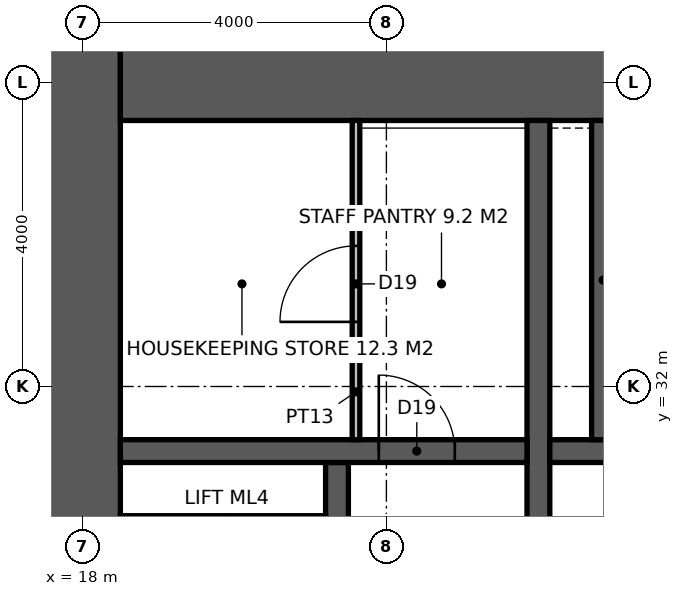
"""IFC4 building model, lengths in metres.
Left out: names, types, materials, properties, quantities, classifications, styles, units other than length and angle.
Written with IfcOpenShell. Run it as: python <this file> out.ifc"""

import sys

from ifc_helpers import new_model, si_unit, direction, frame, frame_2d, origin, place, context, subcontext, project, spatial, rectangle, extrude, element, fill, save


model = new_model("IFC4")
c1 = context("Model", 3, precision=1e-05, world=origin(), true_north=direction((0.0, 1.0)))
c2 = subcontext(c1, "Body", "Model", "MODEL_VIEW")
j1 = project(units=[si_unit("LENGTHUNIT", "METRE"), si_unit("PLANEANGLEUNIT", "RADIAN")], contexts=[c1])
p1 = place(None, origin())
s1 = spatial("IfcSite", under=j1, at=p1, CompositionType="ELEMENT")
p2 = place(p1, origin())
s2 = spatial("IfcBuilding", under=s1, at=p2, CompositionType="ELEMENT")
p3 = place(p2, frame((0.0, 0.0, 109.4)))
s3 = spatial("IfcBuildingStorey", under=s2, at=p3, CompositionType="ELEMENT", Elevation=109.4)
p4 = place(p3, frame((18.0, 17.5, -0.15), z_axis=(0.0, 0.0, 1.0), x_axis=(0.0, 1.0, 0.0)))
e1 = element("IfcWall", 1, at=p4, inside=s3, PredefinedType="SHEAR", context=c2, shape_type="SweptSolid", body=[
    extrude(rectangle(XDim=19.0, YDim=1.0, at=frame_2d((9.5, 0.0))), origin(), (0.0, 0.0, 1.0), 4.0),
])
p5 = place(p3, frame((18.5, 36.0, -0.15), z_axis=(0.0, 0.0, 1.0), x_axis=(1.0, 0.0, 0.0)))
e2 = element("IfcWall", 2, at=p5, inside=s3, PredefinedType="SHEAR", context=c2, shape_type="SweptSolid", body=[
    extrude(rectangle(XDim=17.6, YDim=1.0, at=frame_2d((8.8, 0.0))), origin(), (0.0, 0.0, 1.0), 4.0),
])
p6 = place(p3, frame((24.0, 18.5, -0.15), z_axis=(0.0, 0.0, 1.0), x_axis=(0.0, 1.0, 0.0)))
e3 = element("IfcWall", 3, at=p6, inside=s3, PredefinedType="SHEAR", context=c2, shape_type="SweptSolid", body=[
    extrude(rectangle(XDim=17.0, YDim=0.3, at=frame_2d((8.5, 0.0))), origin(), (0.0, 0.0, 1.0), 4.0),
])
p7 = place(p6, frame((9.6, 0.0, 0.15)))
e4 = element("IfcOpeningElement", 4, at=p7, cuts=e3, PredefinedType="OPENING", context=c2, shape_type="SweptSolid", body=[
    extrude(rectangle(XDim=1.5, YDim=2.4, at=frame_2d((0.75, 1.2))), frame((0.0, 0.16, 0.0), z_axis=(0.0, -1.0, 0.0), x_axis=(1.0, 0.0, 0.0)), (0.0, 0.0, 1.0), 0.32),
])
p8 = place(p3, frame((24.15, 31.15, -0.15), z_axis=(0.0, 0.0, 1.0), x_axis=(1.0, 0.0, 0.0)))
e5 = element("IfcWall", 5, at=p8, inside=s3, PredefinedType="SHEAR", context=c2, shape_type="SweptSolid", body=[
    extrude(rectangle(XDim=11.25, YDim=0.3, at=frame_2d((5.625, 0.0))), origin(), (0.0, 0.0, 1.0), 4.0),
])
p9 = place(p8, frame((7.25, 0.0, 0.15)))
e6 = element("IfcOpeningElement", 6, at=p9, cuts=e5, PredefinedType="OPENING", context=c2, shape_type="SweptSolid", body=[
    extrude(rectangle(XDim=1.4, YDim=2.4, at=frame_2d((0.7, 1.2))), frame((0.0, 0.16, 0.0), z_axis=(0.0, -1.0, 0.0), x_axis=(1.0, 0.0, 0.0)), (0.0, 0.0, 1.0), 0.32),
])
p10 = place(p3, frame((21.35, 18.5, -0.15), z_axis=(0.0, 0.0, 1.0), x_axis=(0.0, 1.0, 0.0)))
e7 = element("IfcWall", 7, at=p10, inside=s3, PredefinedType="SHEAR", context=c2, shape_type="SweptSolid", body=[
    extrude(rectangle(XDim=12.5, YDim=0.3, at=frame_2d((6.25, 0.0))), origin(), (0.0, 0.0, 1.0), 4.0),
])
p11 = place(p10, frame((0.875, 0.0, 0.15)))
e8 = element("IfcOpeningElement", 8, at=p11, cuts=e7, PredefinedType="OPENING", context=c2, shape_type="SweptSolid", body=[
    extrude(rectangle(XDim=1.1, YDim=2.2, at=frame_2d((0.55, 1.1))), frame((0.0, 0.16, 0.0), z_axis=(0.0, -1.0, 0.0), x_axis=(1.0, 0.0, 0.0)), (0.0, 0.0, 1.0), 0.32),
])
p12 = place(p10, frame((3.825, 0.0, 0.15)))
e9 = element("IfcOpeningElement", 9, at=p12, cuts=e7, PredefinedType="OPENING", context=c2, shape_type="SweptSolid", body=[
    extrude(rectangle(XDim=1.1, YDim=2.2, at=frame_2d((0.55, 1.1))), frame((0.0, 0.16, 0.0), z_axis=(0.0, -1.0, 0.0), x_axis=(1.0, 0.0, 0.0)), (0.0, 0.0, 1.0), 0.32),
])
p13 = place(p10, frame((6.675, 0.0, 0.15)))
e10 = element("IfcOpeningElement", 10, at=p13, cuts=e7, PredefinedType="OPENING", context=c2, shape_type="SweptSolid", body=[
    extrude(rectangle(XDim=1.1, YDim=2.2, at=frame_2d((0.55, 1.1))), frame((0.0, 0.16, 0.0), z_axis=(0.0, -1.0, 0.0), x_axis=(1.0, 0.0, 0.0)), (0.0, 0.0, 1.0), 0.32),
])
p14 = place(p10, frame((9.575, 0.0, 0.15)))
e11 = element("IfcOpeningElement", 11, at=p14, cuts=e7, PredefinedType="OPENING", context=c2, shape_type="SweptSolid", body=[
    extrude(rectangle(XDim=1.1, YDim=2.2, at=frame_2d((0.55, 1.1))), frame((0.0, 0.16, 0.0), z_axis=(0.0, -1.0, 0.0), x_axis=(1.0, 0.0, 0.0)), (0.0, 0.0, 1.0), 0.32),
])
p15 = place(p3, frame((18.5, 31.15, -0.15), z_axis=(0.0, 0.0, 1.0), x_axis=(1.0, 0.0, 0.0)))
e12 = element("IfcWall", 12, at=p15, inside=s3, PredefinedType="SHEAR", context=c2, shape_type="SweptSolid", body=[
    extrude(rectangle(XDim=5.35, YDim=0.3, at=frame_2d((2.675, 0.0))), origin(), (0.0, 0.0, 1.0), 4.0),
])
p16 = place(p15, frame((3.4, 0.0, 0.15)))
e13 = element("IfcOpeningElement", 13, at=p16, cuts=e12, PredefinedType="OPENING", context=c2, shape_type="SweptSolid", body=[
    extrude(rectangle(XDim=1.0, YDim=2.2, at=frame_2d((0.5, 1.1))), frame((0.0, 0.16, 0.0), z_axis=(0.0, -1.0, 0.0), x_axis=(1.0, 0.0, 0.0)), (0.0, 0.0, 1.0), 0.32),
])
p17 = place(p3, frame((24.85, 31.3, -0.15), z_axis=(0.0, 0.0, 1.0), x_axis=(0.0, 1.0, 0.0)))
e14 = element("IfcWall", 14, at=p17, inside=s3, PredefinedType="SHEAR", context=c2, shape_type="SweptSolid", body=[
    extrude(rectangle(XDim=4.2, YDim=0.3, at=frame_2d((2.1, 0.0))), origin(), (0.0, 0.0, 1.0), 4.0),
])
p18 = place(p3, frame((21.6, 31.3, 0.0), z_axis=(0.0, 0.0, 1.0), x_axis=(0.0, 1.0, 0.0)))
e15 = element("IfcWall", 15, at=p18, inside=s3, PredefinedType="PARTITIONING", context=c2, shape_type="SweptSolid", body=[
    extrude(rectangle(XDim=4.2, YDim=0.1, at=frame_2d((2.1, 0.0))), origin(), (0.0, 0.0, 1.0), 3.85),
])
p19 = place(p18, frame((1.55, 0.0, 0.0)))
e16 = element("IfcOpeningElement", 16, at=p19, cuts=e15, PredefinedType="OPENING", context=c2, shape_type="SweptSolid", body=[
    extrude(rectangle(XDim=1.0, YDim=2.2, at=frame_2d((0.5, 1.1))), frame((0.0, 0.06, 0.0), z_axis=(0.0, -1.0, 0.0), x_axis=(1.0, 0.0, 0.0)), (0.0, 0.0, 1.0), 0.12),
])
p20 = place(p16, origin())
e17 = element("IfcDoor", 17, at=p20, inside=s3, OperationType="SINGLE_SWING_LEFT", PredefinedType="DOOR", context=c2, shape_type="SweptSolid", body=[
    extrude(rectangle(XDim=1.0, YDim=2.2, at=frame_2d((0.5, 1.1))), frame((0.0, 0.025, 0.0), z_axis=(0.0, -1.0, 0.0), x_axis=(1.0, 0.0, 0.0)), (0.0, 0.0, 1.0), 0.05),
])
fill(e13, e17)
p21 = place(p19, origin())
e18 = element("IfcDoor", 18, at=p21, inside=s3, OperationType="SINGLE_SWING_LEFT", PredefinedType="DOOR", context=c2, shape_type="SweptSolid", body=[
    extrude(rectangle(XDim=1.0, YDim=2.2, at=frame_2d((0.5, 1.1))), frame((0.0, 0.025, 0.0), z_axis=(0.0, -1.0, 0.0), x_axis=(1.0, 0.0, 0.0)), (0.0, 0.0, 1.0), 0.05),
])
fill(e16, e18)
save(model, sys.argv[1])
